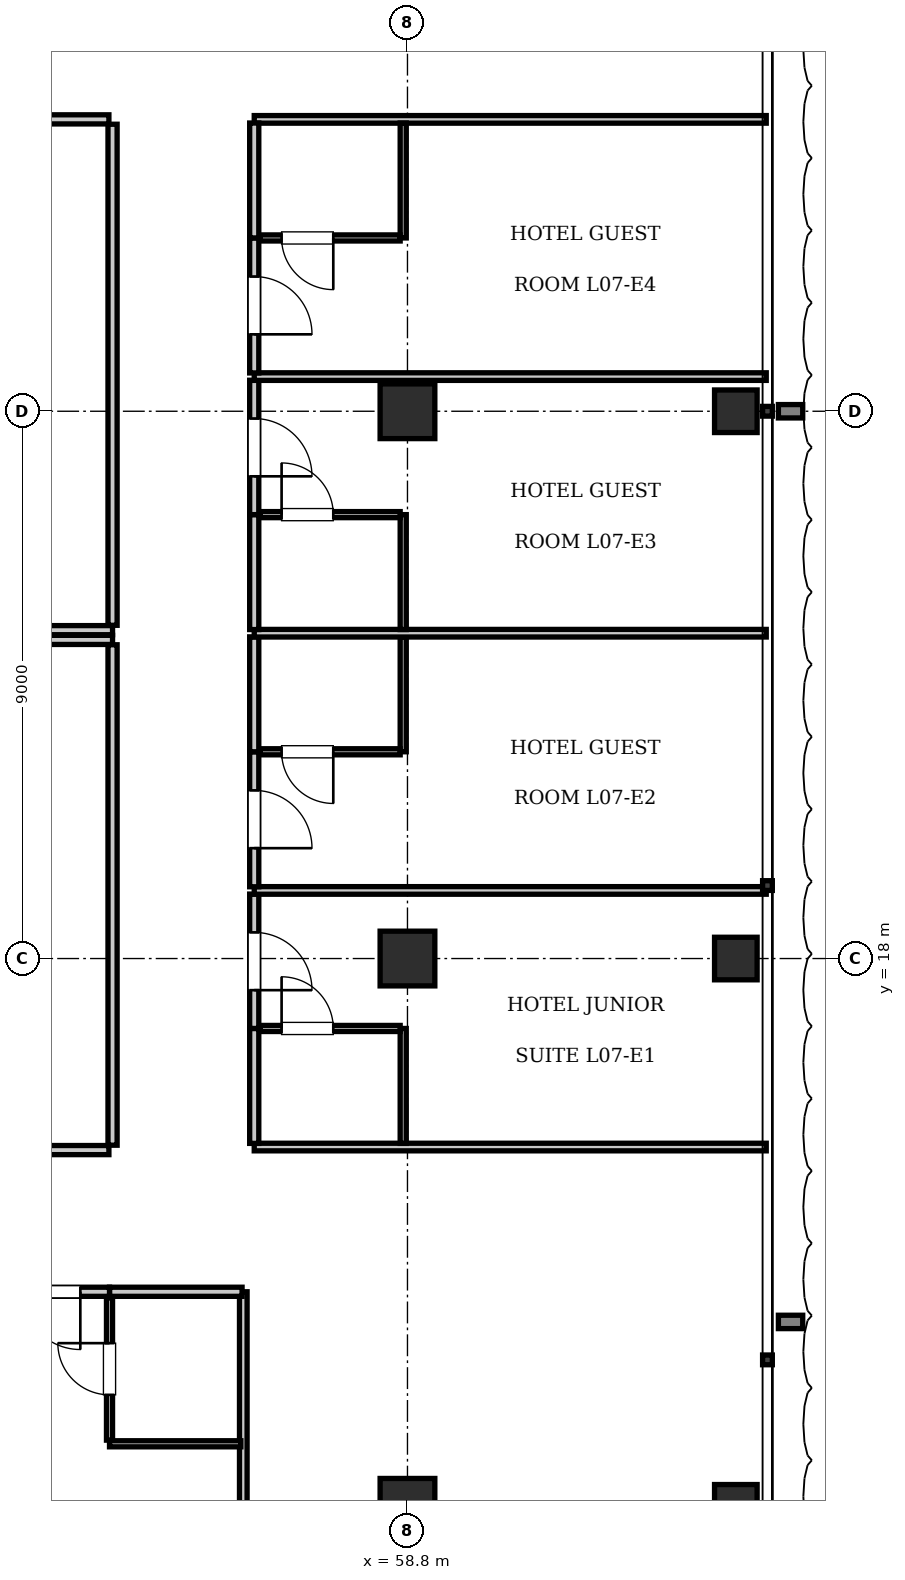
"""IFC4 building model, lengths in metres.
Left out: names, types, materials, properties, quantities, classifications, styles, units other than length and angle.
Written with IfcOpenShell. Run it as: python <this file> out.ifc"""

import sys

from ifc_helpers import new_model, si_unit, direction, frame, frame_2d, origin, origin_2d, place, context, subcontext, project, spatial, rectangle, i_section, extrude, element, fill, save


model = new_model("IFC4")
c1 = context("Model", 3, precision=1e-05, world=origin(), true_north=direction((0.0, 1.0)))
c2 = subcontext(c1, "Body", "Model", "MODEL_VIEW")
j1 = project(units=[si_unit("LENGTHUNIT", "METRE"), si_unit("PLANEANGLEUNIT", "RADIAN")], contexts=[c1])
p1 = place(None, origin())
s1 = spatial("IfcSite", under=j1, at=p1, CompositionType="ELEMENT")
p2 = place(p1, origin())
s2 = spatial("IfcBuilding", under=s1, at=p2, CompositionType="ELEMENT")
p3 = place(p2, frame((0.0, 0.0, 34.65)))
s3 = spatial("IfcBuildingStorey", under=s2, at=p3, CompositionType="ELEMENT", Elevation=34.65)
for number, where, z_axis, x_axis in (
    (1, (58.8, 9.0, 0.0), (0.0, 0.0, 1.0), (1.0, 0.0, 0.0)),
    (2, (58.8, 18.0, 0.0), (0.0, 0.0, 1.0), (1.0, 0.0, 0.0)),
    (3, (58.8, 27.0, 0.0), (0.0, 0.0, 1.0), (1.0, 0.0, 0.0)),
):
    element("IfcColumn", number, at=place(p3, frame(where, z_axis=z_axis, x_axis=x_axis)), inside=s3, PredefinedType="COLUMN", context=c2, shape_type="SweptSolid", body=[
        extrude(rectangle(XDim=0.9, YDim=0.9, at=origin_2d()), origin(), (0.0, 0.0, 1.0), 3.85),
    ])
for number, where, z_axis, x_axis in (
    (4, (64.2, 9.0, 0.0), (0.0, 0.0, 1.0), (1.0, 0.0, 0.0)),
    (5, (64.2, 18.0, 0.0), (0.0, 0.0, 1.0), (1.0, 0.0, 0.0)),
    (6, (64.2, 27.0, 0.0), (0.0, 0.0, 1.0), (1.0, 0.0, 0.0)),
):
    element("IfcColumn", number, at=place(p3, frame(where, z_axis=z_axis, x_axis=x_axis)), inside=s3, PredefinedType="COLUMN", context=c2, shape_type="SweptSolid", body=[
        extrude(i_section(OverallWidth=0.7, OverallDepth=0.7, WebThickness=0.028, FlangeThickness=0.044, at=origin_2d()), origin(), (0.0, 0.0, 1.0), 3.85),
    ])
p4 = place(p3, frame((21.65, 23.4, 0.0), z_axis=(0.0, 0.0, 1.0), x_axis=(1.0, 0.0, 0.0)))
e7 = element("IfcWall", 7, at=p4, inside=s3, PredefinedType="PARTITIONING", context=c2, shape_type="SweptSolid", body=[
    extrude(rectangle(XDim=32.3, YDim=0.15, at=frame_2d((16.15, 0.0))), origin(), (0.0, 0.0, 1.0), 3.61),
])
p5 = place(p3, frame((53.95, 23.48, 0.0), z_axis=(0.0, 0.0, 1.0), x_axis=(0.0, 1.0, 0.0)))
e8 = element("IfcWall", 8, at=p5, inside=s3, PredefinedType="PARTITIONING", context=c2, shape_type="SweptSolid", body=[
    extrude(rectangle(XDim=8.24, YDim=0.15, at=frame_2d((4.12, 0.0))), origin(), (0.0, 0.0, 1.0), 3.61),
])
p6 = place(p3, frame((42.998, 31.8, 0.0), z_axis=(0.0, 0.0, 1.0), x_axis=(1.0, 0.0, 0.0)))
e9 = element("IfcWall", 9, at=p6, inside=s3, PredefinedType="PARTITIONING", context=c2, shape_type="SweptSolid", body=[
    extrude(rectangle(XDim=10.892, YDim=0.15, at=frame_2d((5.446, 0.0))), origin(), (0.0, 0.0, 1.0), 3.61),
])
p7 = place(p6, frame((4.996, 0.0, 0.0)))
e10 = element("IfcOpeningElement", 10, at=p7, cuts=e9, PredefinedType="OPENING", context=c2, shape_type="SweptSolid", body=[
    extrude(rectangle(XDim=0.9, YDim=2.1, at=frame_2d((0.45, 1.05))), frame((0.0, 0.085, 0.0), z_axis=(0.0, -1.0, 0.0), x_axis=(1.0, 0.0, 0.0)), (0.0, 0.0, 1.0), 0.17),
])
p8 = place(p3, frame((21.65, 23.24, 0.0), z_axis=(0.0, 0.0, 1.0), x_axis=(1.0, 0.0, 0.0)))
e11 = element("IfcWall", 11, at=p8, inside=s3, PredefinedType="PARTITIONING", context=c2, shape_type="SweptSolid", body=[
    extrude(rectangle(XDim=32.3, YDim=0.15, at=frame_2d((16.15, 0.0))), origin(), (0.0, 0.0, 1.0), 3.61),
])
p9 = place(p3, frame((53.95, 14.93, 0.0), z_axis=(0.0, 0.0, 1.0), x_axis=(0.0, 1.0, 0.0)))
e12 = element("IfcWall", 12, at=p9, inside=s3, PredefinedType="PARTITIONING", context=c2, shape_type="SweptSolid", body=[
    extrude(rectangle(XDim=8.23, YDim=0.15, at=frame_2d((4.115, 0.0))), origin(), (0.0, 0.0, 1.0), 3.61),
])
p10 = place(p3, frame((33.631, 14.85, 0.0), z_axis=(0.0, 0.0, 1.0), x_axis=(1.0, 0.0, 0.0)))
e13 = element("IfcWall", 13, at=p10, inside=s3, PredefinedType="PARTITIONING", context=c2, shape_type="SweptSolid", body=[
    extrude(rectangle(XDim=20.259, YDim=0.15, at=frame_2d((10.129, 0.0))), origin(), (0.0, 0.0, 1.0), 3.61),
])
p11 = place(p10, frame((9.679, 0.0, 0.0)))
e14 = element("IfcOpeningElement", 14, at=p11, cuts=e13, PredefinedType="OPENING", context=c2, shape_type="SweptSolid", body=[
    extrude(rectangle(XDim=0.9, YDim=2.1, at=frame_2d((0.45, 1.05))), frame((0.0, 0.085, 0.0), z_axis=(0.0, -1.0, 0.0), x_axis=(1.0, 0.0, 0.0)), (0.0, 0.0, 1.0), 0.17),
])
p12 = place(p3, frame((56.1, 0.1, 0.0), z_axis=(0.0, 0.0, 1.0), x_axis=(0.0, 1.0, 0.0)))
e15 = element("IfcWall", 15, at=p12, inside=s3, PredefinedType="PARTITIONING", context=c2, shape_type="SweptSolid", body=[
    extrude(rectangle(XDim=12.42, YDim=0.125, at=frame_2d((6.21, 0.0))), origin(), (0.0, 0.0, 1.0), 3.61),
])
p13 = place(p3, frame((53.9, 12.52, 0.0), z_axis=(0.0, 0.0, 1.0), x_axis=(1.0, 0.0, 0.0)))
e16 = element("IfcWall", 16, at=p13, inside=s3, PredefinedType="PARTITIONING", context=c2, shape_type="SweptSolid", body=[
    extrude(rectangle(XDim=2.18, YDim=0.15, at=frame_2d((1.09, 0.0))), origin(), (0.0, 0.0, 1.0), 3.61),
])
p14 = place(p3, frame((53.9, 10.02, 0.0), z_axis=(0.0, 0.0, 1.0), x_axis=(1.0, 0.0, 0.0)))
e17 = element("IfcWall", 17, at=p14, inside=s3, PredefinedType="PARTITIONING", context=c2, shape_type="SweptSolid", body=[
    extrude(rectangle(XDim=2.16, YDim=0.1, at=frame_2d((1.08, 0.0))), origin(), (0.0, 0.0, 1.0), 3.61),
])
p15 = place(p3, frame((53.9, 10.08, 0.0), z_axis=(0.0, 0.0, 1.0), x_axis=(0.0, 1.0, 0.0)))
e18 = element("IfcWall", 18, at=p15, inside=s3, PredefinedType="PARTITIONING", context=c2, shape_type="SweptSolid", body=[
    extrude(rectangle(XDim=2.34, YDim=0.1, at=frame_2d((1.17, 0.0))), origin(), (0.0, 0.0, 1.0), 3.61),
])
p16 = place(p15, frame((0.745, 0.0, 0.0)))
e19 = element("IfcOpeningElement", 19, at=p16, cuts=e18, PredefinedType="OPENING", context=c2, shape_type="SweptSolid", body=[
    extrude(rectangle(XDim=0.85, YDim=2.1, at=frame_2d((0.425, 1.05))), frame((0.0, 0.06, 0.0), z_axis=(0.0, -1.0, 0.0), x_axis=(1.0, 0.0, 0.0)), (0.0, 0.0, 1.0), 0.12),
])
p17 = place(p3, frame((51.99, 12.52, 0.0), z_axis=(0.0, 0.0, 1.0), x_axis=(1.0, 0.0, 0.0)))
e20 = element("IfcWall", 20, at=p17, inside=s3, PredefinedType="PARTITIONING", context=c2, shape_type="SweptSolid", body=[
    extrude(rectangle(XDim=1.91, YDim=0.15, at=frame_2d((0.955, 0.0))), origin(), (0.0, 0.0, 1.0), 3.61),
])
p18 = place(p17, frame((0.48, 0.0, 0.0)))
e21 = element("IfcOpeningElement", 21, at=p18, cuts=e20, PredefinedType="OPENING", context=c2, shape_type="SweptSolid", body=[
    extrude(rectangle(XDim=0.95, YDim=2.15, at=frame_2d((0.475, 1.075))), frame((0.0, 0.085, 0.0), z_axis=(0.0, -1.0, 0.0), x_axis=(1.0, 0.0, 0.0)), (0.0, 0.0, 1.0), 0.17),
])
for number, where, z_axis, x_axis in (
    (22, (56.28, 14.9, 0.0), (0.0, 0.0, 1.0), (1.0, 0.0, 0.0)),
    (23, (56.28, 31.8, 0.0), (0.0, 0.0, 1.0), (1.0, 0.0, 0.0)),
):
    element("IfcWall", number, at=place(p3, frame(where, z_axis=z_axis, x_axis=x_axis)), inside=s3, PredefinedType="PARTITIONING", context=c2, shape_type="SweptSolid", body=[
        extrude(rectangle(XDim=8.42, YDim=0.125, at=frame_2d((4.21, 0.0))), origin(), (0.0, 0.0, 1.0), 3.61),
    ])
p19 = place(p3, frame((56.28, 14.96, 0.0), z_axis=(0.0, 0.0, 1.0), x_axis=(0.0, 1.0, 0.0)))
e24 = element("IfcWall", 24, at=p19, inside=s3, PredefinedType="PARTITIONING", context=c2, shape_type="SweptSolid", body=[
    extrude(rectangle(XDim=1.89, YDim=0.15, at=frame_2d((0.945, 0.0))), origin(), (0.0, 0.0, 1.0), 3.61),
])
p20 = place(p3, frame((56.28, 16.85, 0.0), z_axis=(0.0, 0.0, 1.0), x_axis=(0.0, 1.0, 0.0)))
e25 = element("IfcWall", 25, at=p20, inside=s3, PredefinedType="PARTITIONING", context=c2, shape_type="SweptSolid", body=[
    extrude(rectangle(XDim=2.21, YDim=0.15, at=frame_2d((1.105, 0.0))), origin(), (0.0, 0.0, 1.0), 3.61),
])
p21 = place(p20, frame((0.63, 0.0, 0.0)))
e26 = element("IfcOpeningElement", 26, at=p21, cuts=e25, PredefinedType="OPENING", context=c2, shape_type="SweptSolid", body=[
    extrude(rectangle(XDim=0.95, YDim=2.15, at=frame_2d((0.475, 1.075))), frame((0.0, 0.085, 0.0), z_axis=(0.0, -1.0, 0.0), x_axis=(1.0, 0.0, 0.0)), (0.0, 0.0, 1.0), 0.17),
])
p22 = place(p3, frame((58.73, 14.96, 0.0), z_axis=(0.0, 0.0, 1.0), x_axis=(0.0, 1.0, 0.0)))
e27 = element("IfcWall", 27, at=p22, inside=s3, PredefinedType="PARTITIONING", context=c2, shape_type="SweptSolid", body=[
    extrude(rectangle(XDim=1.89, YDim=0.1, at=frame_2d((0.945, 0.0))), origin(), (0.0, 0.0, 1.0), 2.988),
])
p23 = place(p3, frame((56.38, 16.85, 0.0), z_axis=(0.0, 0.0, 1.0), x_axis=(1.0, 0.0, 0.0)))
e28 = element("IfcWall", 28, at=p23, inside=s3, PredefinedType="PARTITIONING", context=c2, shape_type="SweptSolid", body=[
    extrude(rectangle(XDim=2.3, YDim=0.1, at=frame_2d((1.15, 0.0))), origin(), (0.0, 0.0, 1.0), 3.61),
])
p24 = place(p23, frame((0.35, 0.0, 0.0)))
e29 = element("IfcOpeningElement", 29, at=p24, cuts=e28, PredefinedType="OPENING", context=c2, shape_type="SweptSolid", body=[
    extrude(rectangle(XDim=0.85, YDim=2.1, at=frame_2d((0.425, 1.05))), frame((0.0, 0.06, 0.0), z_axis=(0.0, -1.0, 0.0), x_axis=(1.0, 0.0, 0.0)), (0.0, 0.0, 1.0), 0.12),
])
p25 = place(p3, frame((56.28, 19.12, 0.0), z_axis=(0.0, 0.0, 1.0), x_axis=(1.0, 0.0, 0.0)))
e30 = element("IfcWall", 30, at=p25, inside=s3, PredefinedType="PARTITIONING", context=c2, shape_type="SweptSolid", body=[
    extrude(rectangle(XDim=8.42, YDim=0.125, at=frame_2d((4.21, 0.0))), origin(), (0.0, 0.0, 1.0), 3.61),
])
p26 = place(p3, frame((56.28, 19.18, 0.0), z_axis=(0.0, 0.0, 1.0), x_axis=(0.0, 1.0, 0.0)))
e31 = element("IfcWall", 31, at=p26, inside=s3, PredefinedType="PARTITIONING", context=c2, shape_type="SweptSolid", body=[
    extrude(rectangle(XDim=2.22, YDim=0.15, at=frame_2d((1.11, 0.0))), origin(), (0.0, 0.0, 1.0), 3.61),
])
p27 = place(p26, frame((0.635, 0.0, 0.0)))
e32 = element("IfcOpeningElement", 32, at=p27, cuts=e31, PredefinedType="OPENING", context=c2, shape_type="SweptSolid", body=[
    extrude(rectangle(XDim=0.95, YDim=2.15, at=frame_2d((0.475, 1.075))), frame((0.0, 0.085, 0.0), z_axis=(0.0, -1.0, 0.0), x_axis=(1.0, 0.0, 0.0)), (0.0, 0.0, 1.0), 0.17),
])
p28 = place(p3, frame((56.28, 21.4, 0.0), z_axis=(0.0, 0.0, 1.0), x_axis=(0.0, 1.0, 0.0)))
e33 = element("IfcWall", 33, at=p28, inside=s3, PredefinedType="PARTITIONING", context=c2, shape_type="SweptSolid", body=[
    extrude(rectangle(XDim=1.89, YDim=0.15, at=frame_2d((0.945, 0.0))), origin(), (0.0, 0.0, 1.0), 3.61),
])
p29 = place(p3, frame((58.73, 21.4, 0.0), z_axis=(0.0, 0.0, 1.0), x_axis=(0.0, 1.0, 0.0)))
e34 = element("IfcWall", 34, at=p29, inside=s3, PredefinedType="PARTITIONING", context=c2, shape_type="SweptSolid", body=[
    extrude(rectangle(XDim=1.89, YDim=0.1, at=frame_2d((0.945, 0.0))), origin(), (0.0, 0.0, 1.0), 2.988),
])
p30 = place(p3, frame((56.38, 21.4, 0.0), z_axis=(0.0, 0.0, 1.0), x_axis=(1.0, 0.0, 0.0)))
e35 = element("IfcWall", 35, at=p30, inside=s3, PredefinedType="PARTITIONING", context=c2, shape_type="SweptSolid", body=[
    extrude(rectangle(XDim=2.3, YDim=0.1, at=frame_2d((1.15, 0.0))), origin(), (0.0, 0.0, 1.0), 3.61),
])
p31 = place(p30, frame((0.35, 0.0, 0.0)))
e36 = element("IfcOpeningElement", 36, at=p31, cuts=e35, PredefinedType="OPENING", context=c2, shape_type="SweptSolid", body=[
    extrude(rectangle(XDim=0.85, YDim=2.1, at=frame_2d((0.425, 1.05))), frame((0.0, 0.06, 0.0), z_axis=(0.0, -1.0, 0.0), x_axis=(1.0, 0.0, 0.0)), (0.0, 0.0, 1.0), 0.12),
])
p32 = place(p3, frame((56.28, 23.35, 0.0), z_axis=(0.0, 0.0, 1.0), x_axis=(1.0, 0.0, 0.0)))
e37 = element("IfcWall", 37, at=p32, inside=s3, PredefinedType="PARTITIONING", context=c2, shape_type="SweptSolid", body=[
    extrude(rectangle(XDim=8.42, YDim=0.125, at=frame_2d((4.21, 0.0))), origin(), (0.0, 0.0, 1.0), 3.61),
])
p33 = place(p3, frame((56.28, 23.41, 0.0), z_axis=(0.0, 0.0, 1.0), x_axis=(0.0, 1.0, 0.0)))
e38 = element("IfcWall", 38, at=p33, inside=s3, PredefinedType="PARTITIONING", context=c2, shape_type="SweptSolid", body=[
    extrude(rectangle(XDim=1.89, YDim=0.15, at=frame_2d((0.945, 0.0))), origin(), (0.0, 0.0, 1.0), 3.61),
])
p34 = place(p3, frame((56.28, 25.3, 0.0), z_axis=(0.0, 0.0, 1.0), x_axis=(0.0, 1.0, 0.0)))
e39 = element("IfcWall", 39, at=p34, inside=s3, PredefinedType="PARTITIONING", context=c2, shape_type="SweptSolid", body=[
    extrude(rectangle(XDim=2.21, YDim=0.15, at=frame_2d((1.105, 0.0))), origin(), (0.0, 0.0, 1.0), 3.61),
])
p35 = place(p34, frame((0.63, 0.0, 0.0)))
e40 = element("IfcOpeningElement", 40, at=p35, cuts=e39, PredefinedType="OPENING", context=c2, shape_type="SweptSolid", body=[
    extrude(rectangle(XDim=0.95, YDim=2.15, at=frame_2d((0.475, 1.075))), frame((0.0, 0.085, 0.0), z_axis=(0.0, -1.0, 0.0), x_axis=(1.0, 0.0, 0.0)), (0.0, 0.0, 1.0), 0.17),
])
p36 = place(p3, frame((58.73, 23.41, 0.0), z_axis=(0.0, 0.0, 1.0), x_axis=(0.0, 1.0, 0.0)))
e41 = element("IfcWall", 41, at=p36, inside=s3, PredefinedType="PARTITIONING", context=c2, shape_type="SweptSolid", body=[
    extrude(rectangle(XDim=1.89, YDim=0.1, at=frame_2d((0.945, 0.0))), origin(), (0.0, 0.0, 1.0), 2.988),
])
p37 = place(p3, frame((56.38, 25.3, 0.0), z_axis=(0.0, 0.0, 1.0), x_axis=(1.0, 0.0, 0.0)))
e42 = element("IfcWall", 42, at=p37, inside=s3, PredefinedType="PARTITIONING", context=c2, shape_type="SweptSolid", body=[
    extrude(rectangle(XDim=2.3, YDim=0.1, at=frame_2d((1.15, 0.0))), origin(), (0.0, 0.0, 1.0), 3.61),
])
p38 = place(p37, frame((0.35, 0.0, 0.0)))
e43 = element("IfcOpeningElement", 43, at=p38, cuts=e42, PredefinedType="OPENING", context=c2, shape_type="SweptSolid", body=[
    extrude(rectangle(XDim=0.85, YDim=2.1, at=frame_2d((0.425, 1.05))), frame((0.0, 0.06, 0.0), z_axis=(0.0, -1.0, 0.0), x_axis=(1.0, 0.0, 0.0)), (0.0, 0.0, 1.0), 0.12),
])
p39 = place(p3, frame((56.28, 27.57, 0.0), z_axis=(0.0, 0.0, 1.0), x_axis=(1.0, 0.0, 0.0)))
e44 = element("IfcWall", 44, at=p39, inside=s3, PredefinedType="PARTITIONING", context=c2, shape_type="SweptSolid", body=[
    extrude(rectangle(XDim=8.42, YDim=0.125, at=frame_2d((4.21, 0.0))), origin(), (0.0, 0.0, 1.0), 3.61),
])
p40 = place(p3, frame((56.28, 27.63, 0.0), z_axis=(0.0, 0.0, 1.0), x_axis=(0.0, 1.0, 0.0)))
e45 = element("IfcWall", 45, at=p40, inside=s3, PredefinedType="PARTITIONING", context=c2, shape_type="SweptSolid", body=[
    extrude(rectangle(XDim=2.22, YDim=0.15, at=frame_2d((1.11, 0.0))), origin(), (0.0, 0.0, 1.0), 3.61),
])
p41 = place(p40, frame((0.635, 0.0, 0.0)))
e46 = element("IfcOpeningElement", 46, at=p41, cuts=e45, PredefinedType="OPENING", context=c2, shape_type="SweptSolid", body=[
    extrude(rectangle(XDim=0.95, YDim=2.15, at=frame_2d((0.475, 1.075))), frame((0.0, 0.085, 0.0), z_axis=(0.0, -1.0, 0.0), x_axis=(1.0, 0.0, 0.0)), (0.0, 0.0, 1.0), 0.17),
])
p42 = place(p3, frame((56.28, 29.85, 0.0), z_axis=(0.0, 0.0, 1.0), x_axis=(0.0, 1.0, 0.0)))
e47 = element("IfcWall", 47, at=p42, inside=s3, PredefinedType="PARTITIONING", context=c2, shape_type="SweptSolid", body=[
    extrude(rectangle(XDim=1.89, YDim=0.15, at=frame_2d((0.945, 0.0))), origin(), (0.0, 0.0, 1.0), 3.61),
])
p43 = place(p3, frame((58.73, 29.85, 0.0), z_axis=(0.0, 0.0, 1.0), x_axis=(0.0, 1.0, 0.0)))
e48 = element("IfcWall", 48, at=p43, inside=s3, PredefinedType="PARTITIONING", context=c2, shape_type="SweptSolid", body=[
    extrude(rectangle(XDim=1.89, YDim=0.1, at=frame_2d((0.945, 0.0))), origin(), (0.0, 0.0, 1.0), 2.988),
])
p44 = place(p3, frame((56.38, 29.85, 0.0), z_axis=(0.0, 0.0, 1.0), x_axis=(1.0, 0.0, 0.0)))
e49 = element("IfcWall", 49, at=p44, inside=s3, PredefinedType="PARTITIONING", context=c2, shape_type="SweptSolid", body=[
    extrude(rectangle(XDim=2.3, YDim=0.1, at=frame_2d((1.15, 0.0))), origin(), (0.0, 0.0, 1.0), 3.61),
])
p45 = place(p44, frame((0.35, 0.0, 0.0)))
e50 = element("IfcOpeningElement", 50, at=p45, cuts=e49, PredefinedType="OPENING", context=c2, shape_type="SweptSolid", body=[
    extrude(rectangle(XDim=0.85, YDim=2.1, at=frame_2d((0.425, 1.05))), frame((0.0, 0.06, 0.0), z_axis=(0.0, -1.0, 0.0), x_axis=(1.0, 0.0, 0.0)), (0.0, 0.0, 1.0), 0.12),
])
p46 = place(p16, origin())
e51 = element("IfcDoor", 51, at=p46, inside=s3, OperationType="SINGLE_SWING_RIGHT", PredefinedType="DOOR", context=c2, shape_type="SweptSolid", body=[
    extrude(rectangle(XDim=0.85, YDim=2.1, at=frame_2d((0.425, 1.05))), frame((0.0, 0.025, 0.0), z_axis=(0.0, -1.0, 0.0), x_axis=(1.0, 0.0, 0.0)), (0.0, 0.0, 1.0), 0.05),
])
fill(e19, e51)
p47 = place(p18, frame((0.95, 0.0, 0.0), z_axis=(0.0, 0.0, 1.0), x_axis=(-1.0, 0.0, 0.0)))
e52 = element("IfcDoor", 52, at=p47, inside=s3, OperationType="SINGLE_SWING_LEFT", PredefinedType="DOOR", context=c2, shape_type="SweptSolid", body=[
    extrude(rectangle(XDim=0.95, YDim=2.15, at=frame_2d((0.475, 1.075))), frame((0.0, 0.025, 0.0), z_axis=(0.0, -1.0, 0.0), x_axis=(1.0, 0.0, 0.0)), (0.0, 0.0, 1.0), 0.05),
])
fill(e21, e52)
p48 = place(p24, origin())
e53 = element("IfcDoor", 53, at=p48, inside=s3, OperationType="SINGLE_SWING_LEFT", PredefinedType="DOOR", context=c2, shape_type="SweptSolid", body=[
    extrude(rectangle(XDim=0.85, YDim=2.1, at=frame_2d((0.425, 1.05))), frame((0.0, 0.025, 0.0), z_axis=(0.0, -1.0, 0.0), x_axis=(1.0, 0.0, 0.0)), (0.0, 0.0, 1.0), 0.05),
])
fill(e29, e53)
p49 = place(p21, frame((0.95, 0.0, 0.0), z_axis=(0.0, 0.0, 1.0), x_axis=(-1.0, 0.0, 0.0)))
e54 = element("IfcDoor", 54, at=p49, inside=s3, OperationType="SINGLE_SWING_RIGHT", PredefinedType="DOOR", context=c2, shape_type="SweptSolid", body=[
    extrude(rectangle(XDim=0.95, YDim=2.15, at=frame_2d((0.475, 1.075))), frame((0.0, 0.025, 0.0), z_axis=(0.0, -1.0, 0.0), x_axis=(1.0, 0.0, 0.0)), (0.0, 0.0, 1.0), 0.05),
])
fill(e26, e54)
p50 = place(p31, frame((0.85, 0.0, 0.0), z_axis=(0.0, 0.0, 1.0), x_axis=(-1.0, 0.0, 0.0)))
e55 = element("IfcDoor", 55, at=p50, inside=s3, OperationType="SINGLE_SWING_LEFT", PredefinedType="DOOR", context=c2, shape_type="SweptSolid", body=[
    extrude(rectangle(XDim=0.85, YDim=2.1, at=frame_2d((0.425, 1.05))), frame((0.0, 0.025, 0.0), z_axis=(0.0, -1.0, 0.0), x_axis=(1.0, 0.0, 0.0)), (0.0, 0.0, 1.0), 0.05),
])
fill(e36, e55)
p51 = place(p27, frame((0.95, 0.0, 0.0), z_axis=(0.0, 0.0, 1.0), x_axis=(-1.0, 0.0, 0.0)))
e56 = element("IfcDoor", 56, at=p51, inside=s3, OperationType="SINGLE_SWING_RIGHT", PredefinedType="DOOR", context=c2, shape_type="SweptSolid", body=[
    extrude(rectangle(XDim=0.95, YDim=2.15, at=frame_2d((0.475, 1.075))), frame((0.0, 0.025, 0.0), z_axis=(0.0, -1.0, 0.0), x_axis=(1.0, 0.0, 0.0)), (0.0, 0.0, 1.0), 0.05),
])
fill(e32, e56)
p52 = place(p38, origin())
e57 = element("IfcDoor", 57, at=p52, inside=s3, OperationType="SINGLE_SWING_LEFT", PredefinedType="DOOR", context=c2, shape_type="SweptSolid", body=[
    extrude(rectangle(XDim=0.85, YDim=2.1, at=frame_2d((0.425, 1.05))), frame((0.0, 0.025, 0.0), z_axis=(0.0, -1.0, 0.0), x_axis=(1.0, 0.0, 0.0)), (0.0, 0.0, 1.0), 0.05),
])
fill(e43, e57)
p53 = place(p35, frame((0.95, 0.0, 0.0), z_axis=(0.0, 0.0, 1.0), x_axis=(-1.0, 0.0, 0.0)))
e58 = element("IfcDoor", 58, at=p53, inside=s3, OperationType="SINGLE_SWING_RIGHT", PredefinedType="DOOR", context=c2, shape_type="SweptSolid", body=[
    extrude(rectangle(XDim=0.95, YDim=2.15, at=frame_2d((0.475, 1.075))), frame((0.0, 0.025, 0.0), z_axis=(0.0, -1.0, 0.0), x_axis=(1.0, 0.0, 0.0)), (0.0, 0.0, 1.0), 0.05),
])
fill(e40, e58)
p54 = place(p45, frame((0.85, 0.0, 0.0), z_axis=(0.0, 0.0, 1.0), x_axis=(-1.0, 0.0, 0.0)))
e59 = element("IfcDoor", 59, at=p54, inside=s3, OperationType="SINGLE_SWING_LEFT", PredefinedType="DOOR", context=c2, shape_type="SweptSolid", body=[
    extrude(rectangle(XDim=0.85, YDim=2.1, at=frame_2d((0.425, 1.05))), frame((0.0, 0.025, 0.0), z_axis=(0.0, -1.0, 0.0), x_axis=(1.0, 0.0, 0.0)), (0.0, 0.0, 1.0), 0.05),
])
fill(e50, e59)
p55 = place(p41, frame((0.95, 0.0, 0.0), z_axis=(0.0, 0.0, 1.0), x_axis=(-1.0, 0.0, 0.0)))
e60 = element("IfcDoor", 60, at=p55, inside=s3, OperationType="SINGLE_SWING_RIGHT", PredefinedType="DOOR", context=c2, shape_type="SweptSolid", body=[
    extrude(rectangle(XDim=0.95, YDim=2.15, at=frame_2d((0.475, 1.075))), frame((0.0, 0.025, 0.0), z_axis=(0.0, -1.0, 0.0), x_axis=(1.0, 0.0, 0.0)), (0.0, 0.0, 1.0), 0.05),
])
fill(e46, e60)
save(model, sys.argv[1])
